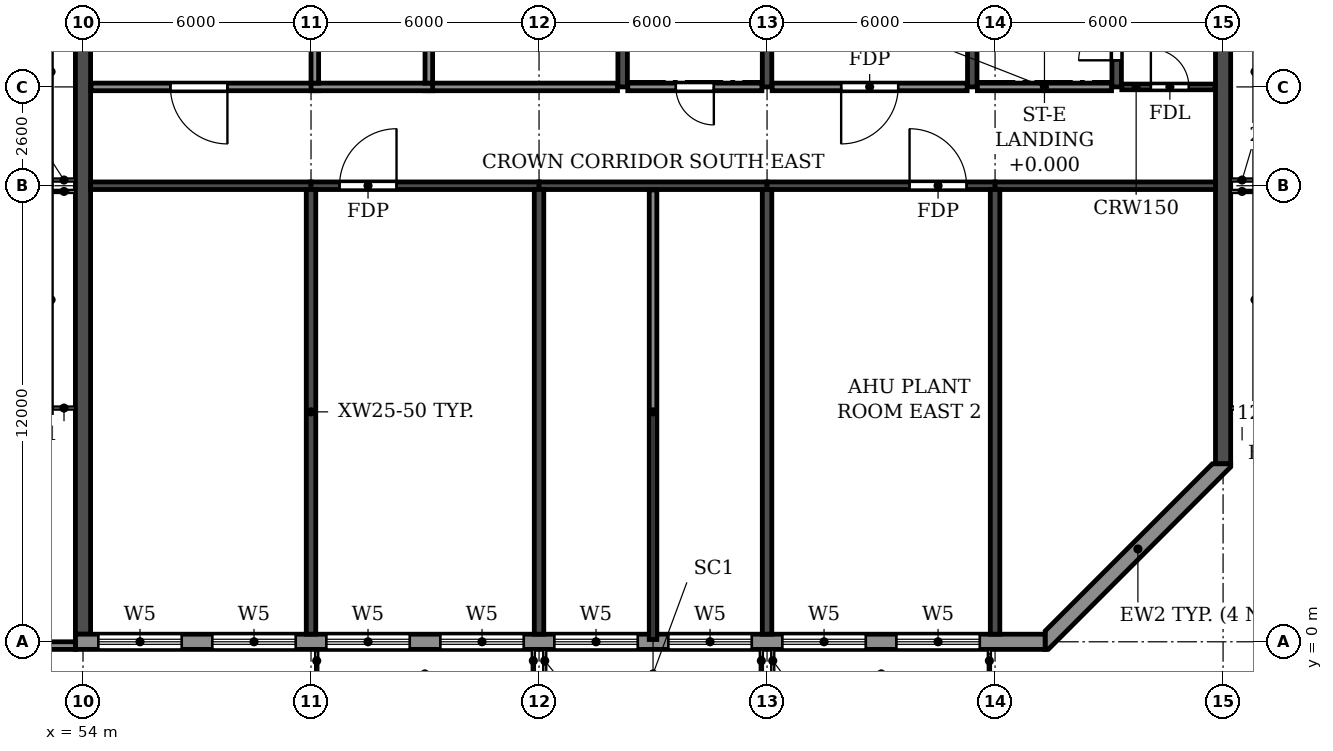
"""IFC4 building model, lengths in metres.
Left out: names, types, materials, properties, quantities, classifications, styles, units other than length and angle.
Written with IfcOpenShell. Run it as: python <this file> out.ifc"""

import sys

from ifc_helpers import new_model, si_unit, direction, frame, frame_2d, origin, place, context, subcontext, project, spatial, polyline, rectangle, outline, extrude, element, fill, save


model = new_model("IFC4")
c1 = context("Model", 3, precision=1e-05, world=origin(), true_north=direction((0.0, 1.0)))
c2 = subcontext(c1, "Body", "Model", "MODEL_VIEW")
j1 = project(units=[si_unit("LENGTHUNIT", "METRE"), si_unit("PLANEANGLEUNIT", "RADIAN")], contexts=[c1])
p1 = place(None, origin())
s1 = spatial("IfcSite", under=j1, at=p1, CompositionType="ELEMENT")
p2 = place(p1, origin())
s2 = spatial("IfcBuilding", under=s1, at=p2, CompositionType="ELEMENT")
p3 = place(p2, frame((0.0, 0.0, 272.4)))
s3 = spatial("IfcBuildingStorey", under=s2, at=p3, CompositionType="ELEMENT", Elevation=272.4)
for number, where, z_axis, x_axis in (
    (1, (60.0, 0.2, 0.0), (0.0, 0.0, 1.0), (0.0, 1.0, 0.0)),
    (2, (66.0, 0.2, 0.0), (0.0, 0.0, 1.0), (0.0, 1.0, 0.0)),
    (3, (72.0, 0.2, 0.0), (0.0, 0.0, 1.0), (0.0, 1.0, 0.0)),
    (4, (78.0, 0.2, 0.0), (0.0, 0.0, 1.0), (0.0, 1.0, 0.0)),
):
    element("IfcWall", number, at=place(p3, frame(where, z_axis=z_axis, x_axis=x_axis)), inside=s3, PredefinedType="SHEAR", context=c2, shape_type="SweptSolid", body=[
        extrude(rectangle(XDim=11.7, YDim=0.25, at=frame_2d((5.85, 0.0))), origin(), (0.0, 0.0, 1.0), 3.05),
    ])
p4 = place(p3, frame((54.0, 0.2, 0.0), z_axis=(0.0, 0.0, 1.0), x_axis=(0.0, 1.0, 0.0)))
e5 = element("IfcWall", 5, at=p4, inside=s3, PredefinedType="SHEAR", context=c2, shape_type="SweptSolid", body=[
    extrude(rectangle(XDim=40.8, YDim=0.4, at=frame_2d((20.4, 0.0))), origin(), (0.0, 0.0, 1.0), 3.05),
])
p5 = place(p3, frame((84.0, 4.683, 0.0), z_axis=(0.0, 0.0, 1.0), x_axis=(0.0, 1.0, 0.0)))
e6 = element("IfcWall", 6, at=p5, inside=s3, PredefinedType="SHEAR", context=c2, shape_type="SweptSolid", body=[
    extrude(rectangle(XDim=31.834, YDim=0.4, at=frame_2d((15.917, 0.0))), origin(), (0.0, 0.0, 1.0), 3.05),
])
p6 = place(p3, frame((54.2, 12.0, 0.0), z_axis=(0.0, 0.0, 1.0), x_axis=(1.0, 0.0, 0.0)))
e7 = element("IfcWall", 7, at=p6, inside=s3, PredefinedType="SHEAR", context=c2, shape_type="SweptSolid", body=[
    extrude(rectangle(XDim=5.8, YDim=0.2, at=frame_2d((2.9, 0.0))), origin(), (0.0, 0.0, 1.0), 2.45),
])
p7 = place(p3, frame((60.0, 12.0, 0.0), z_axis=(0.0, 0.0, 1.0), x_axis=(1.0, 0.0, 0.0)))
e8 = element("IfcWall", 8, at=p7, inside=s3, PredefinedType="SHEAR", context=c2, shape_type="SweptSolid", body=[
    extrude(rectangle(XDim=6.0, YDim=0.2, at=frame_2d((3.0, 0.0))), origin(), (0.0, 0.0, 1.0), 2.45),
])
p8 = place(p7, frame((0.75, 0.0, 0.0)))
e9 = element("IfcOpeningElement", 9, at=p8, cuts=e8, PredefinedType="OPENING", context=c2, shape_type="SweptSolid", body=[
    extrude(rectangle(XDim=1.5, YDim=2.1, at=frame_2d((0.75, 1.05))), frame((0.0, 0.11, 0.0), z_axis=(0.0, -1.0, 0.0), x_axis=(1.0, 0.0, 0.0)), (0.0, 0.0, 1.0), 0.22),
])
p9 = place(p3, frame((66.0, 12.0, 0.0), z_axis=(0.0, 0.0, 1.0), x_axis=(1.0, 0.0, 0.0)))
e10 = element("IfcWall", 10, at=p9, inside=s3, PredefinedType="SHEAR", context=c2, shape_type="SweptSolid", body=[
    extrude(rectangle(XDim=6.0, YDim=0.2, at=frame_2d((3.0, 0.0))), origin(), (0.0, 0.0, 1.0), 2.45),
])
p10 = place(p3, frame((72.0, 12.0, 0.0), z_axis=(0.0, 0.0, 1.0), x_axis=(1.0, 0.0, 0.0)))
e11 = element("IfcWall", 11, at=p10, inside=s3, PredefinedType="SHEAR", context=c2, shape_type="SweptSolid", body=[
    extrude(rectangle(XDim=6.0, YDim=0.2, at=frame_2d((3.0, 0.0))), origin(), (0.0, 0.0, 1.0), 2.45),
])
p11 = place(p10, frame((3.75, 0.0, 0.0)))
e12 = element("IfcOpeningElement", 12, at=p11, cuts=e11, PredefinedType="OPENING", context=c2, shape_type="SweptSolid", body=[
    extrude(rectangle(XDim=1.5, YDim=2.1, at=frame_2d((0.75, 1.05))), frame((0.0, 0.11, 0.0), z_axis=(0.0, -1.0, 0.0), x_axis=(1.0, 0.0, 0.0)), (0.0, 0.0, 1.0), 0.22),
])
p12 = place(p3, frame((78.0, 12.0, 0.0), z_axis=(0.0, 0.0, 1.0), x_axis=(1.0, 0.0, 0.0)))
e13 = element("IfcWall", 13, at=p12, inside=s3, PredefinedType="SHEAR", context=c2, shape_type="SweptSolid", body=[
    extrude(rectangle(XDim=5.8, YDim=0.2, at=frame_2d((2.9, 0.0))), origin(), (0.0, 0.0, 1.0), 2.45),
])
p13 = place(p3, frame((77.4, 14.6, 0.0), z_axis=(0.0, 0.0, 1.0), x_axis=(0.0, 1.0, 0.0)))
e14 = element("IfcWall", 14, at=p13, inside=s3, PredefinedType="SOLIDWALL", context=c2, shape_type="SweptSolid", body=[
    extrude(rectangle(XDim=7.875, YDim=0.25, at=frame_2d((3.938, 0.0))), origin(), (0.0, 0.0, 1.0), 3.05),
])
p14 = place(p3, frame((81.2, 14.6, 0.0), z_axis=(0.0, 0.0, 1.0), x_axis=(0.0, 1.0, 0.0)))
e15 = element("IfcWall", 15, at=p14, inside=s3, PredefinedType="SOLIDWALL", context=c2, shape_type="SweptSolid", body=[
    extrude(rectangle(XDim=7.875, YDim=0.25, at=frame_2d((3.938, 0.0))), origin(), (0.0, 0.0, 1.0), 3.05),
])
p15 = place(p14, frame((0.7, 0.0, 0.0)))
e16 = element("IfcOpeningElement", 16, at=p15, cuts=e15, PredefinedType="OPENING", context=c2, shape_type="SweptSolid", body=[
    extrude(rectangle(XDim=1.0, YDim=2.1, at=frame_2d((0.5, 1.05))), frame((0.0, 0.135, 0.0), z_axis=(0.0, -1.0, 0.0), x_axis=(1.0, 0.0, 0.0)), (0.0, 0.0, 1.0), 0.27),
])
for number, where, z_axis, x_axis in (
    (17, (68.2, 14.6, 0.0), (0.0, 0.0, 1.0), (0.0, 1.0, 0.0)),
    (18, (72.0, 14.6, 0.0), (0.0, 0.0, 1.0), (0.0, 1.0, 0.0)),
):
    element("IfcWall", number, at=place(p3, frame(where, z_axis=z_axis, x_axis=x_axis)), inside=s3, PredefinedType="SOLIDWALL", context=c2, shape_type="SweptSolid", body=[
        extrude(rectangle(XDim=7.875, YDim=0.25, at=frame_2d((3.938, 0.0))), origin(), (0.0, 0.0, 1.0), 3.05),
    ])
p16 = place(p3, frame((53.8, 0.0, 0.0), z_axis=(0.0, 0.0, 1.0), x_axis=(1.0, 0.0, 0.0)))
e19 = element("IfcWall", 19, at=p16, inside=s3, PredefinedType="STANDARD", context=c2, shape_type="SweptSolid", body=[
    extrude(rectangle(XDim=25.517, YDim=0.4, at=frame_2d((12.759, 0.0))), origin(), (0.0, 0.0, 1.0), 3.05),
])
p17 = place(p16, frame((0.6, 0.0, 0.6)))
e20 = element("IfcOpeningElement", 20, at=p17, cuts=e19, PredefinedType="OPENING", context=c2, shape_type="SweptSolid", body=[
    extrude(rectangle(XDim=2.2, YDim=2.4, at=frame_2d((1.1, 1.2))), frame((0.0, 0.21, 0.0), z_axis=(0.0, -1.0, 0.0), x_axis=(1.0, 0.0, 0.0)), (0.0, 0.0, 1.0), 0.42),
])
p18 = place(p16, frame((3.6, 0.0, 0.6)))
e21 = element("IfcOpeningElement", 21, at=p18, cuts=e19, PredefinedType="OPENING", context=c2, shape_type="SweptSolid", body=[
    extrude(rectangle(XDim=2.2, YDim=2.4, at=frame_2d((1.1, 1.2))), frame((0.0, 0.21, 0.0), z_axis=(0.0, -1.0, 0.0), x_axis=(1.0, 0.0, 0.0)), (0.0, 0.0, 1.0), 0.42),
])
p19 = place(p16, frame((6.6, 0.0, 0.6)))
e22 = element("IfcOpeningElement", 22, at=p19, cuts=e19, PredefinedType="OPENING", context=c2, shape_type="SweptSolid", body=[
    extrude(rectangle(XDim=2.2, YDim=2.4, at=frame_2d((1.1, 1.2))), frame((0.0, 0.21, 0.0), z_axis=(0.0, -1.0, 0.0), x_axis=(1.0, 0.0, 0.0)), (0.0, 0.0, 1.0), 0.42),
])
p20 = place(p16, frame((9.6, 0.0, 0.6)))
e23 = element("IfcOpeningElement", 23, at=p20, cuts=e19, PredefinedType="OPENING", context=c2, shape_type="SweptSolid", body=[
    extrude(rectangle(XDim=2.2, YDim=2.4, at=frame_2d((1.1, 1.2))), frame((0.0, 0.21, 0.0), z_axis=(0.0, -1.0, 0.0), x_axis=(1.0, 0.0, 0.0)), (0.0, 0.0, 1.0), 0.42),
])
p21 = place(p16, frame((12.6, 0.0, 0.6)))
e24 = element("IfcOpeningElement", 24, at=p21, cuts=e19, PredefinedType="OPENING", context=c2, shape_type="SweptSolid", body=[
    extrude(rectangle(XDim=2.2, YDim=2.4, at=frame_2d((1.1, 1.2))), frame((0.0, 0.21, 0.0), z_axis=(0.0, -1.0, 0.0), x_axis=(1.0, 0.0, 0.0)), (0.0, 0.0, 1.0), 0.42),
])
p22 = place(p16, frame((15.6, 0.0, 0.6)))
e25 = element("IfcOpeningElement", 25, at=p22, cuts=e19, PredefinedType="OPENING", context=c2, shape_type="SweptSolid", body=[
    extrude(rectangle(XDim=2.2, YDim=2.4, at=frame_2d((1.1, 1.2))), frame((0.0, 0.21, 0.0), z_axis=(0.0, -1.0, 0.0), x_axis=(1.0, 0.0, 0.0)), (0.0, 0.0, 1.0), 0.42),
])
p23 = place(p16, frame((18.6, 0.0, 0.6)))
e26 = element("IfcOpeningElement", 26, at=p23, cuts=e19, PredefinedType="OPENING", context=c2, shape_type="SweptSolid", body=[
    extrude(rectangle(XDim=2.2, YDim=2.4, at=frame_2d((1.1, 1.2))), frame((0.0, 0.21, 0.0), z_axis=(0.0, -1.0, 0.0), x_axis=(1.0, 0.0, 0.0)), (0.0, 0.0, 1.0), 0.42),
])
p24 = place(p16, frame((21.6, 0.0, 0.6)))
e27 = element("IfcOpeningElement", 27, at=p24, cuts=e19, PredefinedType="OPENING", context=c2, shape_type="SweptSolid", body=[
    extrude(rectangle(XDim=2.2, YDim=2.4, at=frame_2d((1.1, 1.2))), frame((0.0, 0.21, 0.0), z_axis=(0.0, -1.0, 0.0), x_axis=(1.0, 0.0, 0.0)), (0.0, 0.0, 1.0), 0.42),
])
p25 = place(p3, origin())
e28 = element("IfcWall", 28, at=p25, inside=s3, PredefinedType="STANDARD", context=c2, shape_type="SweptSolid", body=[
    extrude(outline(polyline([(79.317, -0.2), (79.4, -0.2), (84.2, 4.6), (84.2, 4.683), (83.717, 4.683), (79.317, 0.283), (79.317, -0.2)])), origin(), (0.0, 0.0, 1.0), 3.05),
])
p26 = place(p3, origin())
e29 = element("IfcWall", 29, at=p26, inside=s3, PredefinedType="PARAPET", context=c2, shape_type="SweptSolid", body=[
    extrude(outline(polyline([(53.8, -0.2), (53.8, 0.0), (48.22, 0.0), (48.2, 0.0), (48.2, -0.2), (48.22, -0.2), (53.8, -0.2)])), origin(), (0.0, 0.0, 1.0), 1.1),
])
p27 = place(p3, frame((81.335, 14.6, 0.0), z_axis=(0.0, 0.0, 1.0), x_axis=(1.0, 0.0, 0.0)))
e30 = element("IfcWall", 30, at=p27, inside=s3, PredefinedType="PARTITIONING", context=c2, shape_type="SweptSolid", body=[
    extrude(rectangle(XDim=2.455, YDim=0.15, at=frame_2d((1.228, 0.0))), origin(), (0.0, 0.0, 1.0), 3.05),
])
p28 = place(p27, frame((0.765, 0.0, 0.0)))
e31 = element("IfcOpeningElement", 31, at=p28, cuts=e30, PredefinedType="OPENING", context=c2, shape_type="SweptSolid", body=[
    extrude(rectangle(XDim=1.0, YDim=2.1, at=frame_2d((0.5, 1.05))), frame((0.0, 0.085, 0.0), z_axis=(0.0, -1.0, 0.0), x_axis=(1.0, 0.0, 0.0)), (0.0, 0.0, 1.0), 0.17),
])
p29 = place(p3, frame((54.21, 14.6, 0.0), z_axis=(0.0, 0.0, 1.0), x_axis=(1.0, 0.0, 0.0)))
e32 = element("IfcWall", 32, at=p29, inside=s3, PredefinedType="PARTITIONING", context=c2, shape_type="SweptSolid", body=[
    extrude(rectangle(XDim=5.99, YDim=0.2, at=frame_2d((2.995, 0.0))), origin(), (0.0, 0.0, 1.0), 3.05),
])
p30 = place(p29, frame((2.09, 0.0, 0.0)))
e33 = element("IfcOpeningElement", 33, at=p30, cuts=e32, PredefinedType="OPENING", context=c2, shape_type="SweptSolid", body=[
    extrude(rectangle(XDim=1.5, YDim=2.1, at=frame_2d((0.75, 1.05))), frame((0.0, 0.11, 0.0), z_axis=(0.0, -1.0, 0.0), x_axis=(1.0, 0.0, 0.0)), (0.0, 0.0, 1.0), 0.22),
])
p31 = place(p3, frame((63.0, 14.6, 0.0), z_axis=(0.0, 0.0, 1.0), x_axis=(1.0, 0.0, 0.0)))
e34 = element("IfcWall", 34, at=p31, inside=s3, PredefinedType="PARTITIONING", context=c2, shape_type="SweptSolid", body=[
    extrude(rectangle(XDim=5.065, YDim=0.2, at=frame_2d((2.532, 0.0))), origin(), (0.0, 0.0, 1.0), 3.05),
])
p32 = place(p3, frame((72.135, 14.6, 0.0), z_axis=(0.0, 0.0, 1.0), x_axis=(1.0, 0.0, 0.0)))
e35 = element("IfcWall", 35, at=p32, inside=s3, PredefinedType="PARTITIONING", context=c2, shape_type="SweptSolid", body=[
    extrude(rectangle(XDim=5.13, YDim=0.2, at=frame_2d((2.565, 0.0))), origin(), (0.0, 0.0, 1.0), 3.05),
])
p33 = place(p32, frame((1.815, 0.0, 0.0)))
e36 = element("IfcOpeningElement", 36, at=p33, cuts=e35, PredefinedType="OPENING", context=c2, shape_type="SweptSolid", body=[
    extrude(rectangle(XDim=1.5, YDim=2.1, at=frame_2d((0.75, 1.05))), frame((0.0, 0.11, 0.0), z_axis=(0.0, -1.0, 0.0), x_axis=(1.0, 0.0, 0.0)), (0.0, 0.0, 1.0), 0.22),
])
p34 = place(p3, frame((69.0, 0.06, 0.0), z_axis=(0.0, 0.0, 1.0), x_axis=(0.0, 1.0, 0.0)))
e37 = element("IfcWall", 37, at=p34, inside=s3, PredefinedType="PARTITIONING", context=c2, shape_type="SweptSolid", body=[
    extrude(rectangle(XDim=11.83, YDim=0.2, at=frame_2d((5.915, 0.0))), origin(), (0.0, 0.0, 1.0), 3.05),
])
p35 = place(p3, frame((60.0, 14.6, 0.0), z_axis=(0.0, 0.0, 1.0), x_axis=(1.0, 0.0, 0.0)))
e38 = element("IfcWall", 38, at=p35, inside=s3, PredefinedType="PARTITIONING", context=c2, shape_type="SweptSolid", body=[
    extrude(rectangle(XDim=3.2, YDim=0.2, at=frame_2d((1.6, 0.0))), origin(), (0.0, 0.0, 1.0), 3.05),
])
for number, where, z_axis, x_axis in (
    (39, (60.1, 14.7, 0.0), (0.0, 0.0, 1.0), (0.0, 1.0, 0.0)),
    (40, (63.1, 14.7, 0.0), (0.0, 0.0, 1.0), (0.0, 1.0, 0.0)),
):
    element("IfcWall", number, at=place(p3, frame(where, z_axis=z_axis, x_axis=x_axis)), inside=s3, PredefinedType="PARTITIONING", context=c2, shape_type="SweptSolid", body=[
        extrude(rectangle(XDim=4.2, YDim=0.2, at=frame_2d((2.1, 0.0))), origin(), (0.0, 0.0, 1.0), 3.05),
    ])
p36 = place(p3, frame((68.335, 14.6, 0.0), z_axis=(0.0, 0.0, 1.0), x_axis=(1.0, 0.0, 0.0)))
e41 = element("IfcWall", 41, at=p36, inside=s3, PredefinedType="PARTITIONING", context=c2, shape_type="SweptSolid", body=[
    extrude(rectangle(XDim=3.53, YDim=0.2, at=frame_2d((1.765, 0.0))), origin(), (0.0, 0.0, 1.0), 3.05),
])
p37 = place(p36, frame((1.265, 0.0, 0.0)))
e42 = element("IfcOpeningElement", 42, at=p37, cuts=e41, PredefinedType="OPENING", context=c2, shape_type="SweptSolid", body=[
    extrude(rectangle(XDim=1.0, YDim=2.1, at=frame_2d((0.5, 1.05))), frame((0.0, 0.11, 0.0), z_axis=(0.0, -1.0, 0.0), x_axis=(1.0, 0.0, 0.0)), (0.0, 0.0, 1.0), 0.22),
])
p38 = place(p3, frame((77.535, 14.6, 0.0), z_axis=(0.0, 0.0, 1.0), x_axis=(1.0, 0.0, 0.0)))
e43 = element("IfcWall", 43, at=p38, inside=s3, PredefinedType="PARTITIONING", context=c2, shape_type="SweptSolid", body=[
    extrude(rectangle(XDim=3.53, YDim=0.2, at=frame_2d((1.765, 0.0))), origin(), (0.0, 0.0, 1.0), 3.05),
])
p39 = place(p17, origin())
e44 = element("IfcWindow", 44, at=p39, inside=s3, PartitioningType="TRIPLE_PANEL_HORIZONTAL", PredefinedType="WINDOW", context=c2, shape_type="SweptSolid", body=[
    extrude(rectangle(XDim=2.2, YDim=2.4, at=frame_2d((1.1, 1.2))), frame((0.0, 0.03, 0.0), z_axis=(0.0, -1.0, 0.0), x_axis=(1.0, 0.0, 0.0)), (0.0, 0.0, 1.0), 0.06),
])
fill(e20, e44)
p40 = place(p18, origin())
e45 = element("IfcWindow", 45, at=p40, inside=s3, PartitioningType="TRIPLE_PANEL_HORIZONTAL", PredefinedType="WINDOW", context=c2, shape_type="SweptSolid", body=[
    extrude(rectangle(XDim=2.2, YDim=2.4, at=frame_2d((1.1, 1.2))), frame((0.0, 0.03, 0.0), z_axis=(0.0, -1.0, 0.0), x_axis=(1.0, 0.0, 0.0)), (0.0, 0.0, 1.0), 0.06),
])
fill(e21, e45)
p41 = place(p19, origin())
e46 = element("IfcWindow", 46, at=p41, inside=s3, PartitioningType="TRIPLE_PANEL_HORIZONTAL", PredefinedType="WINDOW", context=c2, shape_type="SweptSolid", body=[
    extrude(rectangle(XDim=2.2, YDim=2.4, at=frame_2d((1.1, 1.2))), frame((0.0, 0.03, 0.0), z_axis=(0.0, -1.0, 0.0), x_axis=(1.0, 0.0, 0.0)), (0.0, 0.0, 1.0), 0.06),
])
fill(e22, e46)
p42 = place(p20, origin())
e47 = element("IfcWindow", 47, at=p42, inside=s3, PartitioningType="TRIPLE_PANEL_HORIZONTAL", PredefinedType="WINDOW", context=c2, shape_type="SweptSolid", body=[
    extrude(rectangle(XDim=2.2, YDim=2.4, at=frame_2d((1.1, 1.2))), frame((0.0, 0.03, 0.0), z_axis=(0.0, -1.0, 0.0), x_axis=(1.0, 0.0, 0.0)), (0.0, 0.0, 1.0), 0.06),
])
fill(e23, e47)
p43 = place(p21, origin())
e48 = element("IfcWindow", 48, at=p43, inside=s3, PartitioningType="TRIPLE_PANEL_HORIZONTAL", PredefinedType="WINDOW", context=c2, shape_type="SweptSolid", body=[
    extrude(rectangle(XDim=2.2, YDim=2.4, at=frame_2d((1.1, 1.2))), frame((0.0, 0.03, 0.0), z_axis=(0.0, -1.0, 0.0), x_axis=(1.0, 0.0, 0.0)), (0.0, 0.0, 1.0), 0.06),
])
fill(e24, e48)
p44 = place(p22, origin())
e49 = element("IfcWindow", 49, at=p44, inside=s3, PartitioningType="TRIPLE_PANEL_HORIZONTAL", PredefinedType="WINDOW", context=c2, shape_type="SweptSolid", body=[
    extrude(rectangle(XDim=2.2, YDim=2.4, at=frame_2d((1.1, 1.2))), frame((0.0, 0.03, 0.0), z_axis=(0.0, -1.0, 0.0), x_axis=(1.0, 0.0, 0.0)), (0.0, 0.0, 1.0), 0.06),
])
fill(e25, e49)
p45 = place(p23, origin())
e50 = element("IfcWindow", 50, at=p45, inside=s3, PartitioningType="TRIPLE_PANEL_HORIZONTAL", PredefinedType="WINDOW", context=c2, shape_type="SweptSolid", body=[
    extrude(rectangle(XDim=2.2, YDim=2.4, at=frame_2d((1.1, 1.2))), frame((0.0, 0.03, 0.0), z_axis=(0.0, -1.0, 0.0), x_axis=(1.0, 0.0, 0.0)), (0.0, 0.0, 1.0), 0.06),
])
fill(e26, e50)
p46 = place(p24, origin())
e51 = element("IfcWindow", 51, at=p46, inside=s3, PartitioningType="TRIPLE_PANEL_HORIZONTAL", PredefinedType="WINDOW", context=c2, shape_type="SweptSolid", body=[
    extrude(rectangle(XDim=2.2, YDim=2.4, at=frame_2d((1.1, 1.2))), frame((0.0, 0.03, 0.0), z_axis=(0.0, -1.0, 0.0), x_axis=(1.0, 0.0, 0.0)), (0.0, 0.0, 1.0), 0.06),
])
fill(e27, e51)
p47 = place(p30, frame((1.5, 0.0, 0.0), z_axis=(0.0, 0.0, 1.0), x_axis=(-1.0, 0.0, 0.0)))
e52 = element("IfcDoor", 52, at=p47, inside=s3, OperationType="DOUBLE_DOOR_SINGLE_SWING", PredefinedType="DOOR", context=c2, shape_type="SweptSolid", body=[
    extrude(rectangle(XDim=1.5, YDim=2.1, at=frame_2d((0.75, 1.05))), frame((0.0, 0.025, 0.0), z_axis=(0.0, -1.0, 0.0), x_axis=(1.0, 0.0, 0.0)), (0.0, 0.0, 1.0), 0.05),
])
fill(e33, e52)
p48 = place(p8, origin())
e53 = element("IfcDoor", 53, at=p48, inside=s3, OperationType="DOUBLE_DOOR_SINGLE_SWING", PredefinedType="DOOR", context=c2, shape_type="SweptSolid", body=[
    extrude(rectangle(XDim=1.5, YDim=2.1, at=frame_2d((0.75, 1.05))), frame((0.0, 0.025, 0.0), z_axis=(0.0, -1.0, 0.0), x_axis=(1.0, 0.0, 0.0)), (0.0, 0.0, 1.0), 0.05),
])
fill(e9, e53)
p49 = place(p33, frame((1.5, 0.0, 0.0), z_axis=(0.0, 0.0, 1.0), x_axis=(-1.0, 0.0, 0.0)))
e54 = element("IfcDoor", 54, at=p49, inside=s3, OperationType="DOUBLE_DOOR_SINGLE_SWING", PredefinedType="DOOR", context=c2, shape_type="SweptSolid", body=[
    extrude(rectangle(XDim=1.5, YDim=2.1, at=frame_2d((0.75, 1.05))), frame((0.0, 0.025, 0.0), z_axis=(0.0, -1.0, 0.0), x_axis=(1.0, 0.0, 0.0)), (0.0, 0.0, 1.0), 0.05),
])
fill(e36, e54)
p50 = place(p11, origin())
e55 = element("IfcDoor", 55, at=p50, inside=s3, OperationType="DOUBLE_DOOR_SINGLE_SWING", PredefinedType="DOOR", context=c2, shape_type="SweptSolid", body=[
    extrude(rectangle(XDim=1.5, YDim=2.1, at=frame_2d((0.75, 1.05))), frame((0.0, 0.025, 0.0), z_axis=(0.0, -1.0, 0.0), x_axis=(1.0, 0.0, 0.0)), (0.0, 0.0, 1.0), 0.05),
])
fill(e12, e55)
p51 = place(p15, origin())
e56 = element("IfcDoor", 56, at=p51, inside=s3, OperationType="SINGLE_SWING_LEFT", PredefinedType="DOOR", context=c2, shape_type="SweptSolid", body=[
    extrude(rectangle(XDim=1.0, YDim=2.1, at=frame_2d((0.5, 1.05))), frame((0.0, 0.025, 0.0), z_axis=(0.0, -1.0, 0.0), x_axis=(1.0, 0.0, 0.0)), (0.0, 0.0, 1.0), 0.05),
])
fill(e16, e56)
p52 = place(p28, origin())
e57 = element("IfcDoor", 57, at=p52, inside=s3, OperationType="SINGLE_SWING_LEFT", PredefinedType="DOOR", context=c2, shape_type="SweptSolid", body=[
    extrude(rectangle(XDim=1.0, YDim=2.1, at=frame_2d((0.5, 1.05))), frame((0.0, 0.025, 0.0), z_axis=(0.0, -1.0, 0.0), x_axis=(1.0, 0.0, 0.0)), (0.0, 0.0, 1.0), 0.05),
])
fill(e31, e57)
p53 = place(p37, frame((1.0, 0.0, 0.0), z_axis=(0.0, 0.0, 1.0), x_axis=(-1.0, 0.0, 0.0)))
e58 = element("IfcDoor", 58, at=p53, inside=s3, OperationType="SINGLE_SWING_LEFT", PredefinedType="DOOR", context=c2, shape_type="SweptSolid", body=[
    extrude(rectangle(XDim=1.0, YDim=2.1, at=frame_2d((0.5, 1.05))), frame((0.0, 0.025, 0.0), z_axis=(0.0, -1.0, 0.0), x_axis=(1.0, 0.0, 0.0)), (0.0, 0.0, 1.0), 0.05),
])
fill(e42, e58)
save(model, sys.argv[1])
